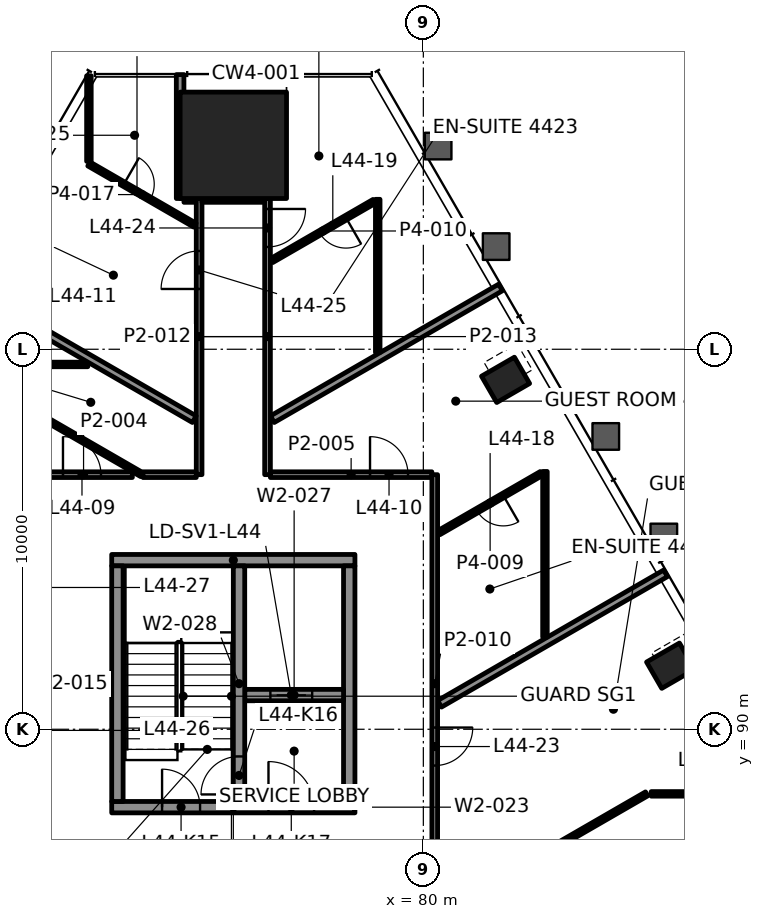
"""IFC4 building model, lengths in metres.
Left out: names, types, materials, properties, quantities, classifications, styles, units other than length and angle.
Written with IfcOpenShell. Run it as: python <this file> out.ifc"""

import sys

from ifc_helpers import new_model, si_unit, direction, frame, frame_2d, origin, origin_2d, place, context, subcontext, project, spatial, rectangle, hollow_rectangle, extrude, element, fill, save


model = new_model("IFC4")
c1 = context("Model", 3, precision=1e-05, world=origin(), true_north=direction((0.0, 1.0)))
c2 = subcontext(c1, "Body", "Model", "MODEL_VIEW")
j1 = project(units=[si_unit("LENGTHUNIT", "METRE"), si_unit("PLANEANGLEUNIT", "RADIAN")], contexts=[c1])
p1 = place(None, origin())
s1 = spatial("IfcSite", under=j1, at=p1, CompositionType="ELEMENT")
p2 = place(p1, origin())
s2 = spatial("IfcBuilding", under=s1, at=p2, CompositionType="ELEMENT")
p3 = place(p2, frame((0.0, 0.0, 190.9)))
s3 = spatial("IfcBuildingStorey", under=s2, at=p3, CompositionType="ELEMENT", Elevation=190.9)
p4 = place(p3, frame((75.0, 105.367, 0.0), z_axis=(0.0, 0.0, 1.0), x_axis=(-1.0, 0.0, 0.0)))
e1 = element("IfcColumn", 1, at=p4, inside=s3, PredefinedType="COLUMN", context=c2, shape_type="SweptSolid", body=[
    extrude(rectangle(XDim=2.8, YDim=2.8, at=origin_2d()), origin(), (0.0, 0.0, 1.0), 3.9),
])
for number, where, z_axis, x_axis in (
    (2, (86.506, 91.673, -0.0), (0.0, 0.0, 1.0), (-0.5, 0.866, 0.0)),
    (3, (82.164, 99.195, -0.0), (0.0, 0.0, 1.0), (-0.5, 0.866, 0.0)),
):
    element("IfcColumn", number, at=place(p3, frame(where, z_axis=z_axis, x_axis=x_axis)), inside=s3, PredefinedType="COLUMN", context=c2, shape_type="SweptSolid", body=[
        extrude(hollow_rectangle(XDim=0.8, YDim=1.0, WallThickness=0.05, at=origin_2d()), origin(), (0.0, 0.0, 1.0), 3.9),
    ])
p5 = place(p3, frame((71.8, 87.95, 0.0), z_axis=(0.0, 0.0, 1.0), x_axis=(1.0, 0.0, 0.0)))
e4 = element("IfcWall", 4, at=p5, inside=s3, PredefinedType="SHEAR", context=c2, shape_type="SweptSolid", body=[
    extrude(rectangle(XDim=6.4, YDim=0.3, at=frame_2d((3.2, 0.0))), origin(), (0.0, 0.0, 1.0), 3.7),
])
p6 = place(p5, frame((1.325, 0.0, 0.0)))
e5 = element("IfcOpeningElement", 5, at=p6, cuts=e4, PredefinedType="OPENING", context=c2, shape_type="SweptSolid", body=[
    extrude(rectangle(XDim=1.0, YDim=2.1, at=frame_2d((0.5, 1.05))), frame((0.0, 0.16, 0.0), z_axis=(0.0, -1.0, 0.0), x_axis=(1.0, 0.0, 0.0)), (0.0, 0.0, 1.0), 0.32),
])
p7 = place(p5, frame((4.125, 0.0, 0.0)))
e6 = element("IfcOpeningElement", 6, at=p7, cuts=e4, PredefinedType="OPENING", context=c2, shape_type="SweptSolid", body=[
    extrude(rectangle(XDim=1.2, YDim=2.1, at=frame_2d((0.6, 1.05))), frame((0.0, 0.16, 0.0), z_axis=(0.0, -1.0, 0.0), x_axis=(1.0, 0.0, 0.0)), (0.0, 0.0, 1.0), 0.32),
])
p8 = place(p3, frame((71.8, 94.45, 0.0), z_axis=(0.0, 0.0, 1.0), x_axis=(1.0, 0.0, 0.0)))
e7 = element("IfcWall", 7, at=p8, inside=s3, PredefinedType="SHEAR", context=c2, shape_type="SweptSolid", body=[
    extrude(rectangle(XDim=6.4, YDim=0.3, at=frame_2d((3.2, 0.0))), origin(), (0.0, 0.0, 1.0), 3.7),
])
for number, where, z_axis, x_axis in (
    (8, (71.95, 88.1, 0.0), (0.0, 0.0, 1.0), (0.0, 1.0, 0.0)),
    (9, (78.05, 88.1, 0.0), (0.0, 0.0, 1.0), (0.0, 1.0, 0.0)),
):
    element("IfcWall", number, at=place(p3, frame(where, z_axis=z_axis, x_axis=x_axis)), inside=s3, PredefinedType="SHEAR", context=c2, shape_type="SweptSolid", body=[
        extrude(rectangle(XDim=6.2, YDim=0.3, at=frame_2d((3.1, 0.0))), origin(), (0.0, 0.0, 1.0), 3.7),
    ])
p9 = place(p3, frame((75.3, 90.9, 0.0), z_axis=(0.0, 0.0, 1.0), x_axis=(1.0, 0.0, 0.0)))
e10 = element("IfcWall", 10, at=p9, inside=s3, PredefinedType="SHEAR", context=c2, shape_type="SweptSolid", body=[
    extrude(rectangle(XDim=2.6, YDim=0.3, at=frame_2d((1.3, 0.0))), origin(), (0.0, 0.0, 1.0), 3.7),
])
p10 = place(p9, frame((0.675, 0.0, 0.0)))
e11 = element("IfcOpeningElement", 11, at=p10, cuts=e10, PredefinedType="OPENING", context=c2, shape_type="SweptSolid", body=[
    extrude(rectangle(XDim=1.1, YDim=2.1, at=frame_2d((0.55, 1.05))), frame((0.0, 0.16, 0.0), z_axis=(0.0, -1.0, 0.0), x_axis=(1.0, 0.0, 0.0)), (0.0, 0.0, 1.0), 0.32),
])
p11 = place(p3, frame((75.15, 88.1, 0.0), z_axis=(0.0, 0.0, 1.0), x_axis=(0.0, 1.0, 0.0)))
e12 = element("IfcWall", 12, at=p11, inside=s3, PredefinedType="SHEAR", context=c2, shape_type="SweptSolid", body=[
    extrude(rectangle(XDim=6.2, YDim=0.3, at=frame_2d((3.1, 0.0))), origin(), (0.0, 0.0, 1.0), 3.7),
])
p12 = place(p11, frame((0.185, 0.0, 0.0)))
e13 = element("IfcOpeningElement", 13, at=p12, cuts=e12, PredefinedType="OPENING", context=c2, shape_type="SweptSolid", body=[
    extrude(rectangle(XDim=1.0, YDim=2.1, at=frame_2d((0.5, 1.05))), frame((0.0, 0.16, 0.0), z_axis=(0.0, -1.0, 0.0), x_axis=(1.0, 0.0, 0.0)), (0.0, 0.0, 1.0), 0.32),
])
p13 = place(p3, frame((89.724, 88.3, 0.0), z_axis=(0.0, 0.0, 1.0), x_axis=(-1.0, 0.0, 0.0)))
e14 = element("IfcWall", 14, at=p13, inside=s3, PredefinedType="PARTITIONING", context=c2, shape_type="SweptSolid", body=[
    extrude(rectangle(XDim=3.728, YDim=0.12, at=frame_2d((1.864, 0.0))), origin(), (0.0, 0.0, 1.0), 3.022),
])
p14 = place(p13, frame((1.752, 0.0, 0.0)))
e15 = element("IfcOpeningElement", 15, at=p14, cuts=e14, PredefinedType="OPENING", context=c2, shape_type="SweptSolid", body=[
    extrude(rectangle(XDim=0.8, YDim=2.1, at=frame_2d((0.4, 1.05))), frame((0.0, 0.07, 0.0), z_axis=(0.0, -1.0, 0.0), x_axis=(1.0, 0.0, 0.0)), (0.0, 0.0, 1.0), 0.14),
])
p15 = place(p3, frame((69.775, 96.7, 0.0), z_axis=(0.0, 0.0, 1.0), x_axis=(1.0, 0.0, 0.0)))
e16 = element("IfcWall", 16, at=p15, inside=s3, PredefinedType="PARTITIONING", context=c2, shape_type="SweptSolid", body=[
    extrude(rectangle(XDim=2.567, YDim=0.15, at=frame_2d((1.284, 0.0))), origin(), (0.0, 0.0, 1.0), 3.1),
])
p16 = place(p15, frame((0.742, 0.0, 0.0)))
e17 = element("IfcOpeningElement", 17, at=p16, cuts=e16, PredefinedType="OPENING", context=c2, shape_type="SweptSolid", body=[
    extrude(rectangle(XDim=1.0, YDim=2.1, at=frame_2d((0.5, 1.05))), frame((0.0, 0.085, 0.0), z_axis=(0.0, -1.0, 0.0), x_axis=(1.0, 0.0, 0.0)), (0.0, 0.0, 1.0), 0.17),
])
p17 = place(p3, frame((75.975, 96.7, 0.0), z_axis=(0.0, 0.0, 1.0), x_axis=(1.0, 0.0, 0.0)))
e18 = element("IfcWall", 18, at=p17, inside=s3, PredefinedType="PARTITIONING", context=c2, shape_type="SweptSolid", body=[
    extrude(rectangle(XDim=4.25, YDim=0.15, at=frame_2d((2.125, 0.0))), origin(), (0.0, 0.0, 1.0), 3.1),
])
p18 = place(p17, frame((2.622, 0.0, 0.0)))
e19 = element("IfcOpeningElement", 19, at=p18, cuts=e18, PredefinedType="OPENING", context=c2, shape_type="SweptSolid", body=[
    extrude(rectangle(XDim=1.0, YDim=2.1, at=frame_2d((0.5, 1.05))), frame((0.0, 0.085, 0.0), z_axis=(0.0, -1.0, 0.0), x_axis=(1.0, 0.0, 0.0)), (0.0, 0.0, 1.0), 0.17),
])
p19 = place(p3, frame((71.17, 99.6, 0.0), z_axis=(0.0, 0.0, 1.0), x_axis=(-1.0, 0.0, 0.0)))
e20 = element("IfcWall", 20, at=p19, inside=s3, PredefinedType="PARTITIONING", context=c2, shape_type="SweptSolid", body=[
    extrude(rectangle(XDim=4.37, YDim=0.12, at=frame_2d((2.185, 0.0))), origin(), (0.0, 0.0, 1.0), 3.1),
])
p20 = place(p19, frame((1.218, 0.0, 0.0)))
e21 = element("IfcOpeningElement", 21, at=p20, cuts=e20, PredefinedType="OPENING", context=c2, shape_type="SweptSolid", body=[
    extrude(rectangle(XDim=0.8, YDim=2.1, at=frame_2d((0.4, 1.05))), frame((0.0, 0.07, 0.0), z_axis=(0.0, -1.0, 0.0), x_axis=(1.0, 0.0, 0.0)), (0.0, 0.0, 1.0), 0.14),
])
p21 = place(p3, frame((73.7, 103.967, 0.0), z_axis=(0.0, 0.0, 1.0), x_axis=(1.0, 0.0, 0.0)))
e22 = element("IfcWall", 22, at=p21, inside=s3, PredefinedType="PARTITIONING", context=c2, shape_type="SweptSolid", body=[
    extrude(rectangle(XDim=0.324, YDim=0.2, at=frame_2d((0.162, 0.0))), origin(), (0.0, 0.0, 1.0), 3.1),
])
p22 = place(p3, frame((80.559, 85.23, 0.0), z_axis=(0.0, 0.0, 1.0), x_axis=(0.866020046725, 0.500009278584, 0.0)))
e23 = element("IfcWall", 23, at=p22, inside=s3, PredefinedType="PARTITIONING", context=c2, shape_type="SweptSolid", body=[
    extrude(rectangle(XDim=6.14, YDim=0.12, at=frame_2d((3.07, 0.0))), origin(), (0.0, 0.0, 1.0), 3.1),
])
p23 = place(p3, frame((80.427, 90.67, 0.0), z_axis=(0.0, 0.0, 1.0), x_axis=(0.866024528585, 0.500001515888, 0.0)))
e24 = element("IfcWall", 24, at=p23, inside=s3, PredefinedType="PARTITIONING", context=c2, shape_type="SweptSolid", body=[
    extrude(rectangle(XDim=6.866, YDim=0.2, at=frame_2d((3.433, 0.0))), origin(), (0.0, 0.0, 1.0), 3.022),
])
p24 = place(p3, frame((83.105, 96.73, 0.0), z_axis=(0.0, 0.0, 1.0), x_axis=(-0.866028856698, -0.499994019331, 0.0)))
e25 = element("IfcWall", 25, at=p24, inside=s3, PredefinedType="PARTITIONING", context=c2, shape_type="SweptSolid", body=[
    extrude(rectangle(XDim=3.113, YDim=0.12, at=frame_2d((1.556, 0.0))), origin(), (0.0, 0.0, 1.0), 3.1),
])
p25 = place(p24, frame((1.156, 0.0, 0.0)))
e26 = element("IfcOpeningElement", 26, at=p25, cuts=e25, PredefinedType="OPENING", context=c2, shape_type="SweptSolid", body=[
    extrude(rectangle(XDim=0.8, YDim=2.1, at=frame_2d((0.4, 1.05))), frame((0.0, 0.07, 0.0), z_axis=(0.0, -1.0, 0.0), x_axis=(1.0, 0.0, 0.0)), (0.0, 0.0, 1.0), 0.14),
])
p26 = place(p3, frame((76.027, 98.159, 0.0), z_axis=(0.0, 0.0, 1.0), x_axis=(0.866026061359, 0.499998861046, 0.0)))
e27 = element("IfcWall", 27, at=p26, inside=s3, PredefinedType="PARTITIONING", context=c2, shape_type="SweptSolid", body=[
    extrude(rectangle(XDim=6.932, YDim=0.2, at=frame_2d((3.466, 0.0))), origin(), (0.0, 0.0, 1.0), 3.1),
])
p27 = place(p3, frame((78.706, 103.89, 0.0), z_axis=(0.0, 0.0, 1.0), x_axis=(-0.866028856698, -0.499994019331, 0.0)))
e28 = element("IfcWall", 28, at=p27, inside=s3, PredefinedType="PARTITIONING", context=c2, shape_type="SweptSolid", body=[
    extrude(rectangle(XDim=3.113, YDim=0.12, at=frame_2d((1.556, 0.0))), origin(), (0.0, 0.0, 1.0), 3.1),
])
p28 = place(p27, frame((0.856, 0.0, 0.0)))
e29 = element("IfcOpeningElement", 29, at=p28, cuts=e28, PredefinedType="OPENING", context=c2, shape_type="SweptSolid", body=[
    extrude(rectangle(XDim=0.8, YDim=2.1, at=frame_2d((0.4, 1.05))), frame((0.0, 0.07, 0.0), z_axis=(0.0, -1.0, 0.0), x_axis=(1.0, 0.0, 0.0)), (0.0, 0.0, 1.0), 0.14),
])
p29 = place(p3, frame((83.2, 92.427, 0.0), z_axis=(0.0, 0.0, 1.0), x_axis=(0.0, 1.0, 0.0)))
e30 = element("IfcWall", 30, at=p29, inside=s3, PredefinedType="PARTITIONING", context=c2, shape_type="SweptSolid", body=[
    extrude(rectangle(XDim=4.358, YDim=0.12, at=frame_2d((2.179, 0.0))), origin(), (0.0, 0.0, 1.0), 3.1),
])
p30 = place(p3, frame((80.3, 96.699, 0.0), z_axis=(0.0, 0.0, 1.0), x_axis=(0.0, -1.0, 0.0)))
e31 = element("IfcWall", 31, at=p30, inside=s3, PredefinedType="PARTITIONING", context=c2, shape_type="SweptSolid", body=[
    extrude(rectangle(XDim=10.999, YDim=0.15, at=frame_2d((5.5, 0.0))), origin(), (0.0, 0.0, 1.0), 3.097),
])
p31 = place(p30, frame((6.654, 0.0, 0.0)))
e32 = element("IfcOpeningElement", 32, at=p31, cuts=e31, PredefinedType="OPENING", context=c2, shape_type="SweptSolid", body=[
    extrude(rectangle(XDim=1.0, YDim=2.1, at=frame_2d((0.5, 1.05))), frame((0.0, 0.085, 0.0), z_axis=(0.0, -1.0, 0.0), x_axis=(1.0, 0.0, 0.0)), (0.0, 0.0, 1.0), 0.17),
])
p32 = place(p3, frame((78.8, 99.916, 0.0), z_axis=(0.0, 0.0, 1.0), x_axis=(0.0, 1.0, 0.0)))
e33 = element("IfcWall", 33, at=p32, inside=s3, PredefinedType="PARTITIONING", context=c2, shape_type="SweptSolid", body=[
    extrude(rectangle(XDim=4.03, YDim=0.12, at=frame_2d((2.015, 0.0))), origin(), (0.0, 0.0, 1.0), 3.1),
])
p33 = place(p3, frame((75.9, 103.966, 0.0), z_axis=(0.0, 0.0, 1.0), x_axis=(0.0, -1.0, 0.0)))
e34 = element("IfcWall", 34, at=p33, inside=s3, PredefinedType="PARTITIONING", context=c2, shape_type="SweptSolid", body=[
    extrude(rectangle(XDim=7.266, YDim=0.15, at=frame_2d((3.633, 0.0))), origin(), (0.0, 0.0, 1.0), 3.1),
])
p34 = place(p33, frame((0.275, 0.0, 0.0)))
e35 = element("IfcOpeningElement", 35, at=p34, cuts=e34, PredefinedType="OPENING", context=c2, shape_type="SweptSolid", body=[
    extrude(rectangle(XDim=1.0, YDim=2.1, at=frame_2d((0.5, 1.05))), frame((0.0, 0.085, 0.0), z_axis=(0.0, -1.0, 0.0), x_axis=(1.0, 0.0, 0.0)), (0.0, 0.0, 1.0), 0.17),
])
p35 = place(p3, frame((74.1, 96.7, 0.0), z_axis=(0.0, 0.0, 1.0), x_axis=(0.0, 1.0, 0.0)))
e36 = element("IfcWall", 36, at=p35, inside=s3, PredefinedType="PARTITIONING", context=c2, shape_type="SweptSolid", body=[
    extrude(rectangle(XDim=7.267, YDim=0.15, at=frame_2d((3.633, 0.0))), origin(), (0.0, 0.0, 1.0), 3.1),
])
p36 = place(p35, frame((4.886, 0.0, 0.0)))
e37 = element("IfcOpeningElement", 37, at=p36, cuts=e36, PredefinedType="OPENING", context=c2, shape_type="SweptSolid", body=[
    extrude(rectangle(XDim=1.0, YDim=2.1, at=frame_2d((0.5, 1.05))), frame((0.0, 0.085, 0.0), z_axis=(0.0, -1.0, 0.0), x_axis=(1.0, 0.0, 0.0)), (0.0, 0.0, 1.0), 0.17),
])
p37 = place(p3, frame((73.6, 103.967, 0.0), z_axis=(0.0, 0.0, 1.0), x_axis=(0.0, 1.0, 0.0)))
e38 = element("IfcWall", 38, at=p37, inside=s3, PredefinedType="PARTITIONING", context=c2, shape_type="SweptSolid", body=[
    extrude(rectangle(XDim=3.26, YDim=0.2, at=frame_2d((1.63, 0.0))), origin(), (0.0, 0.0, 1.0), 3.1),
])
p38 = place(p3, frame((71.2, 104.945, 0.0), z_axis=(0.0, 0.0, 1.0), x_axis=(0.0, 1.0, 0.0)))
e39 = element("IfcWall", 39, at=p38, inside=s3, PredefinedType="PARTITIONING", context=c2, shape_type="SweptSolid", body=[
    extrude(rectangle(XDim=2.252, YDim=0.12, at=frame_2d((1.126, 0.0))), origin(), (0.0, 0.0, 1.0), 3.1),
])
p39 = place(p3, frame((71.2, 104.876, 0.0), z_axis=(0.0, 0.0, 1.0), x_axis=(0.866029130051, -0.499993545862, 0.0)))
e40 = element("IfcWall", 40, at=p39, inside=s3, PredefinedType="PARTITIONING", context=c2, shape_type="SweptSolid", body=[
    extrude(rectangle(XDim=3.222, YDim=0.12, at=frame_2d((1.611, 0.0))), origin(), (0.0, 0.0, 1.0), 3.1),
])
p40 = place(p39, frame((1.061, 0.0, 0.0)))
e41 = element("IfcOpeningElement", 41, at=p40, cuts=e40, PredefinedType="OPENING", context=c2, shape_type="SweptSolid", body=[
    extrude(rectangle(XDim=0.8, YDim=2.1, at=frame_2d((0.4, 1.05))), frame((0.0, 0.07, 0.0), z_axis=(0.0, -1.0, 0.0), x_axis=(1.0, 0.0, 0.0)), (0.0, 0.0, 1.0), 0.14),
])
p41 = place(p3, frame((73.973, 98.159, 0.0), z_axis=(0.0, 0.0, 1.0), x_axis=(-0.866026061359, 0.499998861046, 0.0)))
e42 = element("IfcWall", 42, at=p41, inside=s3, PredefinedType="PARTITIONING", context=c2, shape_type="SweptSolid", body=[
    extrude(rectangle(XDim=6.932, YDim=0.2, at=frame_2d((3.466, 0.0))), origin(), (0.0, 0.0, 1.0), 3.1),
])
p42 = place(p3, frame((72.592, 96.7, 0.0), z_axis=(0.0, 0.0, 1.0), x_axis=(-0.866036013313, 0.499981623307, 0.0)))
e43 = element("IfcWall", 43, at=p42, inside=s3, PredefinedType="PARTITIONING", context=c2, shape_type="SweptSolid", body=[
    extrude(rectangle(XDim=4.865, YDim=0.12, at=frame_2d((2.433, 0.0))), origin(), (0.0, 0.0, 1.0), 3.1),
])
p43 = place(p3, frame((72.622, 96.7, 0.0), z_axis=(0.0, 0.0, 1.0), x_axis=(1.0, 0.0, 0.0)))
e44 = element("IfcWall", 44, at=p43, inside=s3, PredefinedType="PARTITIONING", context=c2, shape_type="SweptSolid", body=[
    extrude(rectangle(XDim=1.403, YDim=0.15, at=frame_2d((0.701, 0.0))), origin(), (0.0, 0.0, 1.0), 3.1),
])
p44 = place(p3, frame((74.175, 103.967, 0.0), z_axis=(0.0, 0.0, 1.0), x_axis=(1.0, 0.0, 0.0)))
e45 = element("IfcWall", 45, at=p44, inside=s3, PredefinedType="PARTITIONING", context=c2, shape_type="SweptSolid", body=[
    extrude(rectangle(XDim=1.649, YDim=0.2, at=frame_2d((0.825, 0.0))), origin(), (0.0, 0.0, 1.0), 3.097),
])
p45 = place(p16, origin())
e46 = element("IfcDoor", 46, at=p45, inside=s3, OperationType="SINGLE_SWING_LEFT", PredefinedType="DOOR", context=c2, shape_type="SweptSolid", body=[
    extrude(rectangle(XDim=1.0, YDim=2.1, at=frame_2d((0.5, 1.05))), frame((0.0, 0.025, 0.0), z_axis=(0.0, -1.0, 0.0), x_axis=(1.0, 0.0, 0.0)), (0.0, 0.0, 1.0), 0.05),
])
fill(e17, e46)
p46 = place(p18, origin())
e47 = element("IfcDoor", 47, at=p46, inside=s3, OperationType="SINGLE_SWING_LEFT", PredefinedType="DOOR", context=c2, shape_type="SweptSolid", body=[
    extrude(rectangle(XDim=1.0, YDim=2.1, at=frame_2d((0.5, 1.05))), frame((0.0, 0.025, 0.0), z_axis=(0.0, -1.0, 0.0), x_axis=(1.0, 0.0, 0.0)), (0.0, 0.0, 1.0), 0.05),
])
fill(e19, e47)
p47 = place(p25, origin())
e48 = element("IfcDoor", 48, at=p47, inside=s3, OperationType="SINGLE_SWING_LEFT", PredefinedType="DOOR", context=c2, shape_type="SweptSolid", body=[
    extrude(rectangle(XDim=0.8, YDim=2.1, at=frame_2d((0.4, 1.05))), frame((0.0, 0.025, 0.0), z_axis=(0.0, -1.0, 0.0), x_axis=(1.0, 0.0, 0.0)), (0.0, 0.0, 1.0), 0.05),
])
fill(e26, e48)
p48 = place(p28, origin())
e49 = element("IfcDoor", 49, at=p48, inside=s3, OperationType="SINGLE_SWING_LEFT", PredefinedType="DOOR", context=c2, shape_type="SweptSolid", body=[
    extrude(rectangle(XDim=0.8, YDim=2.1, at=frame_2d((0.4, 1.05))), frame((0.0, 0.025, 0.0), z_axis=(0.0, -1.0, 0.0), x_axis=(1.0, 0.0, 0.0)), (0.0, 0.0, 1.0), 0.05),
])
fill(e29, e49)
p49 = place(p31, origin())
e50 = element("IfcDoor", 50, at=p49, inside=s3, OperationType="SINGLE_SWING_RIGHT", PredefinedType="DOOR", context=c2, shape_type="SweptSolid", body=[
    extrude(rectangle(XDim=1.0, YDim=2.1, at=frame_2d((0.5, 1.05))), frame((0.0, 0.025, 0.0), z_axis=(0.0, -1.0, 0.0), x_axis=(1.0, 0.0, 0.0)), (0.0, 0.0, 1.0), 0.05),
])
fill(e32, e50)
p50 = place(p34, origin())
e51 = element("IfcDoor", 51, at=p50, inside=s3, OperationType="SINGLE_SWING_RIGHT", PredefinedType="DOOR", context=c2, shape_type="SweptSolid", body=[
    extrude(rectangle(XDim=1.0, YDim=2.1, at=frame_2d((0.5, 1.05))), frame((0.0, 0.025, 0.0), z_axis=(0.0, -1.0, 0.0), x_axis=(1.0, 0.0, 0.0)), (0.0, 0.0, 1.0), 0.05),
])
fill(e35, e51)
p51 = place(p36, origin())
e52 = element("IfcDoor", 52, at=p51, inside=s3, OperationType="SINGLE_SWING_LEFT", PredefinedType="DOOR", context=c2, shape_type="SweptSolid", body=[
    extrude(rectangle(XDim=1.0, YDim=2.1, at=frame_2d((0.5, 1.05))), frame((0.0, 0.025, 0.0), z_axis=(0.0, -1.0, 0.0), x_axis=(1.0, 0.0, 0.0)), (0.0, 0.0, 1.0), 0.05),
])
fill(e37, e52)
p52 = place(p40, origin())
e53 = element("IfcDoor", 53, at=p52, inside=s3, OperationType="SINGLE_SWING_LEFT", PredefinedType="DOOR", context=c2, shape_type="SweptSolid", body=[
    extrude(rectangle(XDim=0.8, YDim=2.1, at=frame_2d((0.4, 1.05))), frame((0.0, 0.025, 0.0), z_axis=(0.0, -1.0, 0.0), x_axis=(1.0, 0.0, 0.0)), (0.0, 0.0, 1.0), 0.05),
])
fill(e41, e53)
p53 = place(p10, origin())
e54 = element("IfcDoor", 54, at=p53, inside=s3, OperationType="DOUBLE_DOOR_SLIDING", PredefinedType="DOOR", context=c2, shape_type="SweptSolid", body=[
    extrude(rectangle(XDim=1.1, YDim=2.1, at=frame_2d((0.55, 1.05))), frame((0.0, 0.025, 0.0), z_axis=(0.0, -1.0, 0.0), x_axis=(1.0, 0.0, 0.0)), (0.0, 0.0, 1.0), 0.05),
])
fill(e11, e54)
p54 = place(p6, origin())
e55 = element("IfcDoor", 55, at=p54, inside=s3, OperationType="SINGLE_SWING_RIGHT", PredefinedType="DOOR", context=c2, shape_type="SweptSolid", body=[
    extrude(rectangle(XDim=1.0, YDim=2.1, at=frame_2d((0.5, 1.05))), frame((0.0, 0.025, 0.0), z_axis=(0.0, -1.0, 0.0), x_axis=(1.0, 0.0, 0.0)), (0.0, 0.0, 1.0), 0.05),
])
fill(e5, e55)
p55 = place(p12, origin())
e56 = element("IfcDoor", 56, at=p55, inside=s3, OperationType="SINGLE_SWING_LEFT", PredefinedType="DOOR", context=c2, shape_type="SweptSolid", body=[
    extrude(rectangle(XDim=1.0, YDim=2.1, at=frame_2d((0.5, 1.05))), frame((0.0, 0.025, 0.0), z_axis=(0.0, -1.0, 0.0), x_axis=(1.0, 0.0, 0.0)), (0.0, 0.0, 1.0), 0.05),
])
fill(e13, e56)
p56 = place(p7, origin())
e57 = element("IfcDoor", 57, at=p56, inside=s3, OperationType="SINGLE_SWING_RIGHT", PredefinedType="DOOR", context=c2, shape_type="SweptSolid", body=[
    extrude(rectangle(XDim=1.2, YDim=2.1, at=frame_2d((0.6, 1.05))), frame((0.0, 0.025, 0.0), z_axis=(0.0, -1.0, 0.0), x_axis=(1.0, 0.0, 0.0)), (0.0, 0.0, 1.0), 0.05),
])
fill(e6, e57)
save(model, sys.argv[1])
